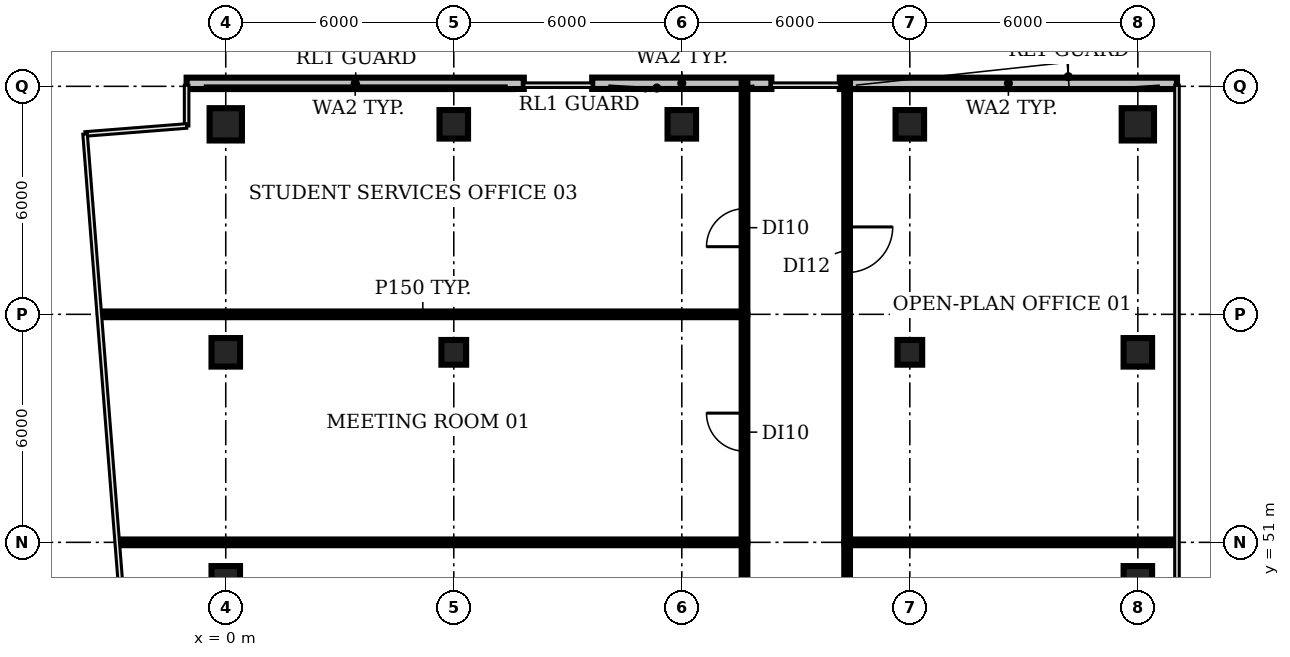
"""IFC4 building model, lengths in metres.
Left out: names, types, materials, properties, quantities, classifications, styles, units other than length and angle.
Written with IfcOpenShell. Run it as: python <this file> out.ifc"""

import sys

from ifc_helpers import new_model, si_unit, direction, frame, frame_2d, origin, origin_2d, place, context, subcontext, project, spatial, rectangle, circle, extrude, element, fill, save


model = new_model("IFC4")
c1 = context("Model", 3, precision=1e-05, world=origin(), true_north=direction((0.0, 1.0)))
c2 = subcontext(c1, "Body", "Model", "MODEL_VIEW")
j1 = project(units=[si_unit("LENGTHUNIT", "METRE"), si_unit("PLANEANGLEUNIT", "RADIAN")], contexts=[c1])
p1 = place(None, origin())
s1 = spatial("IfcSite", under=j1, at=p1, CompositionType="ELEMENT")
p2 = place(p1, origin())
s2 = spatial("IfcBuilding", under=s1, at=p2, CompositionType="ELEMENT")
p3 = place(p2, frame((0.0, 0.0, 306.2)))
s3 = spatial("IfcBuildingStorey", under=s2, at=p3, CompositionType="ELEMENT", Elevation=306.2)
for number, where, z_axis, x_axis in (
    (1, (0.0, 50.0, 0.0), (0.0, 0.0, 1.0), (1.0, 0.0, 0.0)),
    (2, (0.0, 56.0, 0.0), (0.0, 0.0, 1.0), (1.0, 0.0, 0.0)),
):
    element("IfcColumn", number, at=place(p3, frame(where, z_axis=z_axis, x_axis=x_axis)), inside=s3, PredefinedType="COLUMN", context=c2, shape_type="SweptSolid", body=[
        extrude(rectangle(XDim=0.75, YDim=0.75, at=origin_2d()), origin(), (0.0, 0.0, 1.0), 3.85),
    ])
p4 = place(p3, frame((0.0, 62.0, 0.0), z_axis=(0.0, 0.0, 1.0), x_axis=(1.0, 0.0, 0.0)))
e3 = element("IfcColumn", 3, at=p4, inside=s3, PredefinedType="COLUMN", context=c2, shape_type="SweptSolid", body=[
    extrude(circle(Radius=0.425, at=origin_2d()), origin(), (0.0, 0.0, 1.0), 3.85),
])
p5 = place(p3, frame((6.0, 56.0, 0.0), z_axis=(0.0, 0.0, 1.0), x_axis=(1.0, 0.0, 0.0)))
e4 = element("IfcColumn", 4, at=p5, inside=s3, PredefinedType="COLUMN", context=c2, shape_type="SweptSolid", body=[
    extrude(rectangle(XDim=0.65, YDim=0.65, at=origin_2d()), origin(), (0.0, 0.0, 1.0), 3.85),
])
for number, where, z_axis, x_axis in (
    (5, (6.0, 62.0, 0.0), (0.0, 0.0, 1.0), (1.0, 0.0, 0.0)),
    (6, (12.0, 62.0, 0.0), (0.0, 0.0, 1.0), (1.0, 0.0, 0.0)),
):
    element("IfcColumn", number, at=place(p3, frame(where, z_axis=z_axis, x_axis=x_axis)), inside=s3, PredefinedType="COLUMN", context=c2, shape_type="SweptSolid", body=[
        extrude(rectangle(XDim=0.75, YDim=0.75, at=origin_2d()), origin(), (0.0, 0.0, 1.0), 3.85),
    ])
p6 = place(p3, frame((18.0, 56.0, 0.0), z_axis=(0.0, 0.0, 1.0), x_axis=(1.0, 0.0, 0.0)))
e7 = element("IfcColumn", 7, at=p6, inside=s3, PredefinedType="COLUMN", context=c2, shape_type="SweptSolid", body=[
    extrude(rectangle(XDim=0.65, YDim=0.65, at=origin_2d()), origin(), (0.0, 0.0, 1.0), 3.85),
])
for number, where, z_axis, x_axis in (
    (8, (18.0, 62.0, 0.0), (0.0, 0.0, 1.0), (1.0, 0.0, 0.0)),
    (9, (24.0, 50.0, 0.0), (0.0, 0.0, 1.0), (1.0, 0.0, 0.0)),
    (10, (24.0, 56.0, 0.0), (0.0, 0.0, 1.0), (1.0, 0.0, 0.0)),
):
    element("IfcColumn", number, at=place(p3, frame(where, z_axis=z_axis, x_axis=x_axis)), inside=s3, PredefinedType="COLUMN", context=c2, shape_type="SweptSolid", body=[
        extrude(rectangle(XDim=0.75, YDim=0.75, at=origin_2d()), origin(), (0.0, 0.0, 1.0), 3.85),
    ])
p7 = place(p3, frame((24.0, 62.0, 0.0), z_axis=(0.0, 0.0, 1.0), x_axis=(1.0, 0.0, 0.0)))
e11 = element("IfcColumn", 11, at=p7, inside=s3, PredefinedType="COLUMN", context=c2, shape_type="SweptSolid", body=[
    extrude(circle(Radius=0.425, at=origin_2d()), origin(), (0.0, 0.0, 1.0), 3.85),
])
p8 = place(p3, frame((25.03, 63.078, 0.0), z_axis=(0.0, 0.0, 1.0), x_axis=(-1.0, 0.0, 0.0)))
e12 = element("IfcWall", 12, at=p8, inside=s3, PredefinedType="SOLIDWALL", context=c2, shape_type="SweptSolid", body=[
    extrude(rectangle(XDim=8.873, YDim=0.3, at=frame_2d((4.436, 0.0))), origin(), (0.0, 0.0, 1.0), 3.85),
])
p9 = place(p3, frame((14.357, 63.08, 0.0), z_axis=(0.0, 0.0, 1.0), x_axis=(-1.0, 0.0, 0.0)))
e13 = element("IfcWall", 13, at=p9, inside=s3, PredefinedType="SOLIDWALL", context=c2, shape_type="SweptSolid", body=[
    extrude(rectangle(XDim=4.715, YDim=0.3, at=frame_2d((2.357, 0.0))), origin(), (0.0, 0.0, 1.0), 3.85),
])
p10 = place(p3, frame((7.843, 63.078, 0.0), z_axis=(0.0, 0.0, 1.0), x_axis=(-1.0, 0.0, 0.0)))
e14 = element("IfcWall", 14, at=p10, inside=s3, PredefinedType="SOLIDWALL", context=c2, shape_type="SweptSolid", body=[
    extrude(rectangle(XDim=8.873, YDim=0.3, at=frame_2d((4.436, 0.0))), origin(), (0.0, 0.0, 1.0), 3.85),
])
p11 = place(p3, frame((-3.28, 57.0, 0.0), z_axis=(0.0, 0.0, 1.0), x_axis=(1.0, 0.0, 0.0)))
e15 = element("IfcWall", 15, at=p11, inside=s3, PredefinedType="PARTITIONING", context=c2, shape_type="SweptSolid", body=[
    extrude(rectangle(XDim=16.93, YDim=0.15, at=frame_2d((8.465, 0.0))), origin(), (0.0, 0.0, 1.0), 2.9),
])
p12 = place(p3, frame((-2.81, 51.0, 0.0), z_axis=(0.0, 0.0, 1.0), x_axis=(1.0, 0.0, 0.0)))
e16 = element("IfcWall", 16, at=p12, inside=s3, PredefinedType="PARTITIONING", context=c2, shape_type="SweptSolid", body=[
    extrude(rectangle(XDim=16.46, YDim=0.15, at=frame_2d((8.23, 0.0))), origin(), (0.0, 0.0, 1.0), 2.9),
])
p13 = place(p3, frame((13.65, 39.0, 0.0), z_axis=(0.0, 0.0, 1.0), x_axis=(0.0, 1.0, 0.0)))
e17 = element("IfcWall", 17, at=p13, inside=s3, PredefinedType="PARTITIONING", context=c2, shape_type="SweptSolid", body=[
    extrude(rectangle(XDim=12.0, YDim=0.15, at=frame_2d((6.0, 0.0))), origin(), (0.0, 0.0, 1.0), 2.9),
])
p14 = place(p13, frame((5.5, 0.0, 0.0)))
e18 = element("IfcOpeningElement", 18, at=p14, cuts=e17, PredefinedType="OPENING", context=c2, shape_type="SweptSolid", body=[
    extrude(rectangle(XDim=1.2, YDim=2.1, at=frame_2d((0.6, 1.05))), frame((0.0, 0.085, 0.0), z_axis=(0.0, -1.0, 0.0), x_axis=(1.0, 0.0, 0.0)), (0.0, 0.0, 1.0), 0.17),
])
p15 = place(p3, frame((13.65, 51.0, 0.0), z_axis=(0.0, 0.0, 1.0), x_axis=(0.0, 1.0, 0.0)))
e19 = element("IfcWall", 19, at=p15, inside=s3, PredefinedType="PARTITIONING", context=c2, shape_type="SweptSolid", body=[
    extrude(rectangle(XDim=6.0, YDim=0.15, at=frame_2d((3.0, 0.0))), origin(), (0.0, 0.0, 1.0), 2.9),
])
p16 = place(p15, frame((2.4, 0.0, 0.0)))
e20 = element("IfcOpeningElement", 20, at=p16, cuts=e19, PredefinedType="OPENING", context=c2, shape_type="SweptSolid", body=[
    extrude(rectangle(XDim=1.0, YDim=2.1, at=frame_2d((0.5, 1.05))), frame((0.0, 0.085, 0.0), z_axis=(0.0, -1.0, 0.0), x_axis=(1.0, 0.0, 0.0)), (0.0, 0.0, 1.0), 0.17),
])
p17 = place(p3, frame((13.65, 57.0, 0.0), z_axis=(0.0, 0.0, 1.0), x_axis=(0.0, 1.0, 0.0)))
e21 = element("IfcWall", 21, at=p17, inside=s3, PredefinedType="PARTITIONING", context=c2, shape_type="SweptSolid", body=[
    extrude(rectangle(XDim=6.09, YDim=0.15, at=frame_2d((3.045, 0.0))), origin(), (0.0, 0.0, 1.0), 2.9),
])
p18 = place(p17, frame((1.78, 0.0, 0.0)))
e22 = element("IfcOpeningElement", 22, at=p18, cuts=e21, PredefinedType="OPENING", context=c2, shape_type="SweptSolid", body=[
    extrude(rectangle(XDim=1.0, YDim=2.1, at=frame_2d((0.5, 1.05))), frame((0.0, 0.085, 0.0), z_axis=(0.0, -1.0, 0.0), x_axis=(1.0, 0.0, 0.0)), (0.0, 0.0, 1.0), 0.17),
])
p19 = place(p3, frame((16.35, 51.0, 0.0), z_axis=(0.0, 0.0, 1.0), x_axis=(0.0, -1.0, 0.0)))
e23 = element("IfcWall", 23, at=p19, inside=s3, PredefinedType="PARTITIONING", context=c2, shape_type="SweptSolid", body=[
    extrude(rectangle(XDim=6.0, YDim=0.15, at=frame_2d((3.0, 0.0))), origin(), (0.0, 0.0, 1.0), 2.9),
])
p20 = place(p19, frame((2.5, 0.0, 0.0)))
e24 = element("IfcOpeningElement", 24, at=p20, cuts=e23, PredefinedType="OPENING", context=c2, shape_type="SweptSolid", body=[
    extrude(rectangle(XDim=1.2, YDim=2.1, at=frame_2d((0.6, 1.05))), frame((0.0, 0.085, 0.0), z_axis=(0.0, -1.0, 0.0), x_axis=(1.0, 0.0, 0.0)), (0.0, 0.0, 1.0), 0.17),
])
p21 = place(p3, frame((16.35, 51.0, 0.0), z_axis=(0.0, 0.0, 1.0), x_axis=(1.0, 0.0, 0.0)))
e25 = element("IfcWall", 25, at=p21, inside=s3, PredefinedType="PARTITIONING", context=c2, shape_type="SweptSolid", body=[
    extrude(rectangle(XDim=8.63, YDim=0.15, at=frame_2d((4.315, 0.0))), origin(), (0.0, 0.0, 1.0), 2.9),
])
p22 = place(p3, frame((16.35, 63.09, 0.0), z_axis=(0.0, 0.0, 1.0), x_axis=(0.0, -1.0, 0.0)))
e26 = element("IfcWall", 26, at=p22, inside=s3, PredefinedType="PARTITIONING", context=c2, shape_type="SweptSolid", body=[
    extrude(rectangle(XDim=12.09, YDim=0.15, at=frame_2d((6.045, 0.0))), origin(), (0.0, 0.0, 1.0), 2.9),
])
p23 = place(p22, frame((3.79, 0.0, 0.0)))
e27 = element("IfcOpeningElement", 27, at=p23, cuts=e26, PredefinedType="OPENING", context=c2, shape_type="SweptSolid", body=[
    extrude(rectangle(XDim=1.2, YDim=2.1, at=frame_2d((0.6, 1.05))), frame((0.0, 0.085, 0.0), z_axis=(0.0, -1.0, 0.0), x_axis=(1.0, 0.0, 0.0)), (0.0, 0.0, 1.0), 0.17),
])
p24 = place(p16, origin())
e28 = element("IfcDoor", 28, at=p24, inside=s3, OperationType="SINGLE_SWING_RIGHT", PredefinedType="DOOR", context=c2, shape_type="SweptSolid", body=[
    extrude(rectangle(XDim=1.0, YDim=2.1, at=frame_2d((0.5, 1.05))), frame((0.0, 0.025, 0.0), z_axis=(0.0, -1.0, 0.0), x_axis=(1.0, 0.0, 0.0)), (0.0, 0.0, 1.0), 0.05),
])
fill(e20, e28)
p25 = place(p18, origin())
e29 = element("IfcDoor", 29, at=p25, inside=s3, OperationType="SINGLE_SWING_LEFT", PredefinedType="DOOR", context=c2, shape_type="SweptSolid", body=[
    extrude(rectangle(XDim=1.0, YDim=2.1, at=frame_2d((0.5, 1.05))), frame((0.0, 0.025, 0.0), z_axis=(0.0, -1.0, 0.0), x_axis=(1.0, 0.0, 0.0)), (0.0, 0.0, 1.0), 0.05),
])
fill(e22, e29)
p26 = place(p23, origin())
e30 = element("IfcDoor", 30, at=p26, inside=s3, OperationType="SINGLE_SWING_LEFT", PredefinedType="DOOR", context=c2, shape_type="SweptSolid", body=[
    extrude(rectangle(XDim=1.2, YDim=2.1, at=frame_2d((0.6, 1.05))), frame((0.0, 0.025, 0.0), z_axis=(0.0, -1.0, 0.0), x_axis=(1.0, 0.0, 0.0)), (0.0, 0.0, 1.0), 0.05),
])
fill(e27, e30)
save(model, sys.argv[1])
